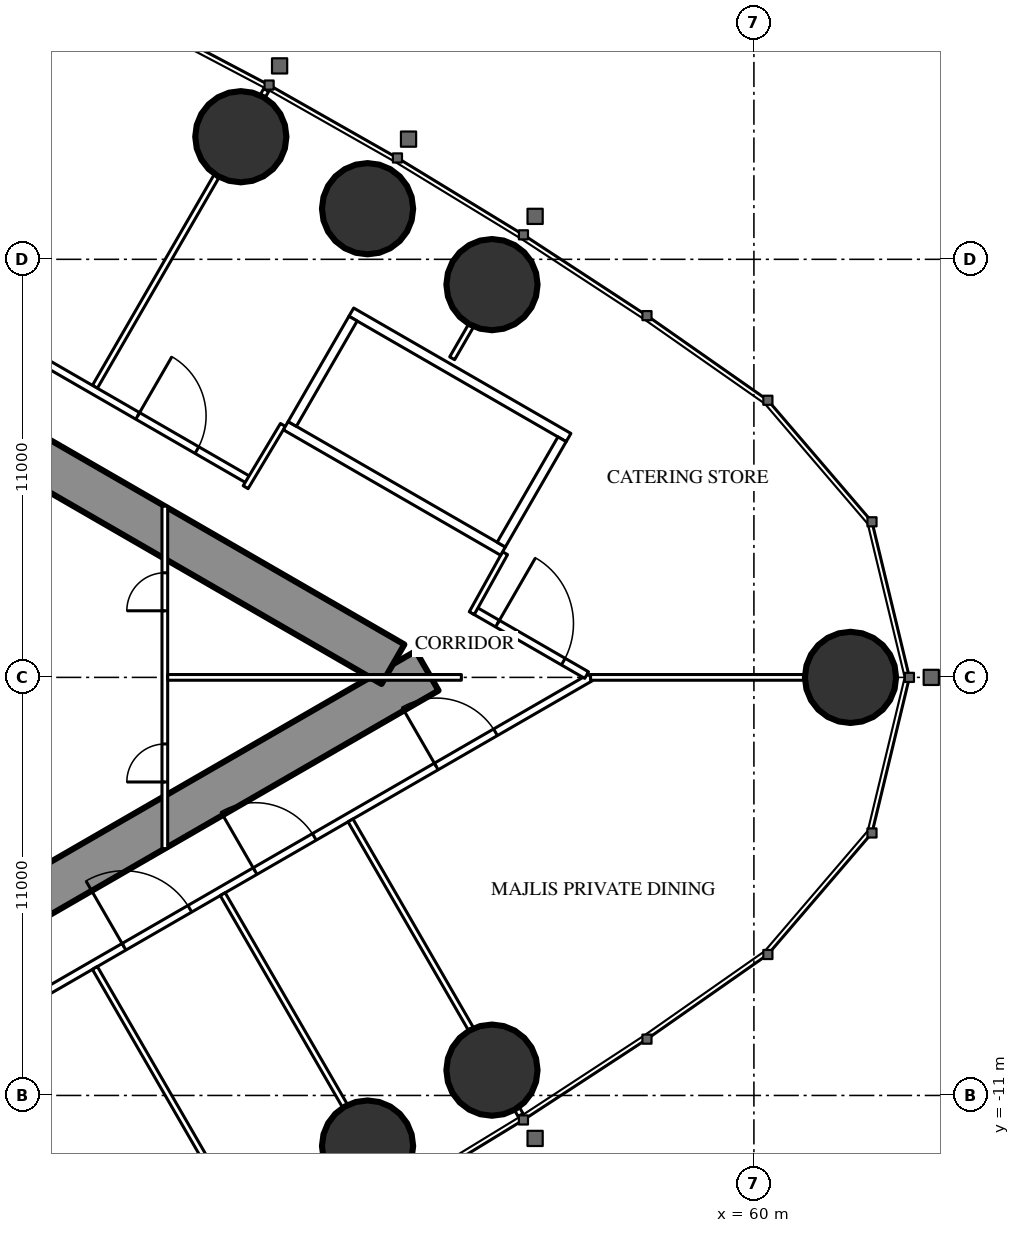
"""IFC4 building model, lengths in metres.
Left out: names, types, materials, properties, quantities, classifications, styles, units other than length and angle.
Written with IfcOpenShell. Run it as: python <this file> out.ifc"""

import sys

from ifc_helpers import new_model, si_unit, direction, frame, frame_2d, origin, origin_2d, place, context, subcontext, project, spatial, rectangle, circle, extrude, element, fill, save


model = new_model("IFC4")
c1 = context("Model", 3, precision=1e-05, world=origin(), true_north=direction((0.0, 1.0)))
c2 = subcontext(c1, "Body", "Model", "MODEL_VIEW")
j1 = project(units=[si_unit("LENGTHUNIT", "METRE"), si_unit("PLANEANGLEUNIT", "RADIAN")], contexts=[c1])
p1 = place(None, origin())
s1 = spatial("IfcSite", under=j1, at=p1, CompositionType="ELEMENT")
p2 = place(p1, origin())
s2 = spatial("IfcBuilding", under=s1, at=p2, CompositionType="ELEMENT")
p3 = place(p2, frame((0.0, 0.0, 251.9)))
s3 = spatial("IfcBuildingStorey", under=s2, at=p3, CompositionType="ELEMENT", Elevation=251.9)
for number, where, z_axis, x_axis in (
    (1, (62.542, 0.0, 0.0), (0.0, 0.0, 1.0), (1.0, 0.0, 0.0)),
    (2, (53.108, 10.334, 0.0), (0.0, 0.0, 1.0), (1.0, 0.0, 0.0)),
    (3, (49.834, 12.332, 0.0), (0.0, 0.0, 1.0), (1.0, 0.0, 0.0)),
    (4, (46.499, 14.226, 0.0), (0.0, 0.0, 1.0), (1.0, 0.0, 0.0)),
    (5, (49.834, -12.332, 0.0), (0.0, 0.0, 1.0), (1.0, 0.0, 0.0)),
    (6, (53.108, -10.334, 0.0), (0.0, 0.0, 1.0), (1.0, 0.0, 0.0)),
):
    element("IfcColumn", number, at=place(p3, frame(where, z_axis=z_axis, x_axis=x_axis)), inside=s3, PredefinedType="COLUMN", context=c2, shape_type="SweptSolid", body=[
        extrude(circle(Radius=1.2, at=origin_2d()), origin(), (0.0, 0.0, 1.0), 5.4),
    ])
p4 = place(p3, frame((27.2, -13.8, 0.0), z_axis=(0.0, 0.0, 1.0), x_axis=(0.866027159892, 0.499996958321, 0.0)))
e7 = element("IfcWall", 7, at=p4, inside=s3, PredefinedType="SHEAR", context=c2, shape_type="SweptSolid", body=[
    extrude(rectangle(XDim=27.947, YDim=1.2, at=frame_2d((13.973, 0.0))), origin(), (0.0, 0.0, 1.0), 5.4),
])
p5 = place(p4, frame((4.6, 0.0, 0.0)))
e8 = element("IfcOpeningElement", 8, at=p5, cuts=e7, PredefinedType="OPENING", context=c2, shape_type="SweptSolid", body=[
    extrude(rectangle(XDim=1.0, YDim=2.2, at=frame_2d((0.5, 1.1))), frame((0.0, 0.61, 0.0), z_axis=(0.0, -1.0, 0.0), x_axis=(1.0, 0.0, 0.0)), (0.0, 0.0, 1.0), 1.22),
])
p6 = place(p4, frame((13.395, 0.0, 0.0)))
e9 = element("IfcOpeningElement", 9, at=p6, cuts=e7, PredefinedType="OPENING", context=c2, shape_type="SweptSolid", body=[
    extrude(rectangle(XDim=1.8, YDim=2.2, at=frame_2d((0.9, 1.1))), frame((0.0, 0.61, 0.0), z_axis=(0.0, -1.0, 0.0), x_axis=(1.0, 0.0, 0.0)), (0.0, 0.0, 1.0), 1.22),
])
p7 = place(p3, frame((27.2, 13.8, 0.0), z_axis=(0.0, 0.0, 1.0), x_axis=(0.866024515034, -0.500001539357, 0.0)))
e10 = element("IfcWall", 10, at=p7, inside=s3, PredefinedType="SHEAR", context=c2, shape_type="SweptSolid", body=[
    extrude(rectangle(XDim=26.907, YDim=1.2, at=frame_2d((13.454, 0.0))), origin(), (0.0, 0.0, 1.0), 5.4),
])
p8 = place(p7, frame((4.6, 0.0, 0.0)))
e11 = element("IfcOpeningElement", 11, at=p8, cuts=e10, PredefinedType="OPENING", context=c2, shape_type="SweptSolid", body=[
    extrude(rectangle(XDim=1.0, YDim=2.2, at=frame_2d((0.5, 1.1))), frame((0.0, 0.61, 0.0), z_axis=(0.0, -1.0, 0.0), x_axis=(1.0, 0.0, 0.0)), (0.0, 0.0, 1.0), 1.22),
])
p9 = place(p7, frame((13.395, 0.0, 0.0)))
e12 = element("IfcOpeningElement", 12, at=p9, cuts=e10, PredefinedType="OPENING", context=c2, shape_type="SweptSolid", body=[
    extrude(rectangle(XDim=1.8, YDim=2.2, at=frame_2d((0.9, 1.1))), frame((0.0, 0.61, 0.0), z_axis=(0.0, -1.0, 0.0), x_axis=(1.0, 0.0, 0.0)), (0.0, 0.0, 1.0), 1.22),
])
p10 = place(p3, frame((28.907, -15.47, 0.0), z_axis=(0.0, 0.0, 1.0), x_axis=(0.866023700353, 0.500002950419, 0.0)))
e13 = element("IfcWall", 13, at=p10, inside=s3, PredefinedType="PARTITIONING", context=c2, shape_type="SweptSolid", body=[
    extrude(rectangle(XDim=30.941, YDim=0.2, at=frame_2d((15.47, 0.0))), origin(), (0.0, 0.0, 1.0), 5.15),
])
p11 = place(p10, frame((7.124, 0.0, 0.0)))
e14 = element("IfcOpeningElement", 14, at=p11, cuts=e13, PredefinedType="OPENING", context=c2, shape_type="SweptSolid", body=[
    extrude(rectangle(XDim=1.8, YDim=2.2, at=frame_2d((0.9, 1.1))), frame((0.0, 0.11, 0.0), z_axis=(0.0, -1.0, 0.0), x_axis=(1.0, 0.0, 0.0)), (0.0, 0.0, 1.0), 0.22),
])
p12 = place(p10, frame((16.765, 0.0, 0.0)))
e15 = element("IfcOpeningElement", 15, at=p12, cuts=e13, PredefinedType="OPENING", context=c2, shape_type="SweptSolid", body=[
    extrude(rectangle(XDim=2.0, YDim=2.4, at=frame_2d((1.0, 1.2))), frame((0.0, 0.11, 0.0), z_axis=(0.0, -1.0, 0.0), x_axis=(1.0, 0.0, 0.0)), (0.0, 0.0, 1.0), 0.22),
])
p13 = place(p10, frame((20.748, 0.0, 0.0)))
e16 = element("IfcOpeningElement", 16, at=p13, cuts=e13, PredefinedType="OPENING", context=c2, shape_type="SweptSolid", body=[
    extrude(rectangle(XDim=1.8, YDim=2.2, at=frame_2d((0.9, 1.1))), frame((0.0, 0.11, 0.0), z_axis=(0.0, -1.0, 0.0), x_axis=(1.0, 0.0, 0.0)), (0.0, 0.0, 1.0), 0.22),
])
p14 = place(p10, frame((26.252, 0.0, 0.0)))
e17 = element("IfcOpeningElement", 17, at=p14, cuts=e13, PredefinedType="OPENING", context=c2, shape_type="SweptSolid", body=[
    extrude(rectangle(XDim=1.8, YDim=2.2, at=frame_2d((0.9, 1.1))), frame((0.0, 0.11, 0.0), z_axis=(0.0, -1.0, 0.0), x_axis=(1.0, 0.0, 0.0)), (0.0, 0.0, 1.0), 0.22),
])
p15 = place(p3, frame((42.66, -7.646, 0.0), z_axis=(0.0, 0.0, 1.0), x_axis=(0.499996592859, -0.866027370889, 0.0)))
e18 = element("IfcWall", 18, at=p15, inside=s3, PredefinedType="PARTITIONING", context=c2, shape_type="SweptSolid", body=[
    extrude(rectangle(XDim=6.398, YDim=0.15, at=frame_2d((3.199, 0.0))), origin(), (0.0, 0.0, 1.0), 4.25),
])
p16 = place(p3, frame((46.023, -5.704, 0.0), z_axis=(0.0, 0.0, 1.0), x_axis=(0.499984478165, -0.866034365135, 0.0)))
e19 = element("IfcWall", 19, at=p16, inside=s3, PredefinedType="PARTITIONING", context=c2, shape_type="SweptSolid", body=[
    extrude(rectangle(XDim=6.426, YDim=0.15, at=frame_2d((3.213, 0.0))), origin(), (0.0, 0.0, 1.0), 4.25),
])
p17 = place(p3, frame((49.385, -3.763, 0.0), z_axis=(0.0, 0.0, 1.0), x_axis=(0.499999447814, -0.866025722589, 0.0)))
e20 = element("IfcWall", 20, at=p17, inside=s3, PredefinedType="PARTITIONING", context=c2, shape_type="SweptSolid", body=[
    extrude(rectangle(XDim=6.333, YDim=0.15, at=frame_2d((3.166, 0.0))), origin(), (0.0, 0.0, 1.0), 4.25),
])
p18 = place(p3, frame((53.771, -11.36, 0.0), z_axis=(0.0, 0.0, 1.0), x_axis=(0.499524978789, -0.866299483762, 0.0)))
e21 = element("IfcWall", 21, at=p18, inside=s3, PredefinedType="PARTITIONING", context=c2, shape_type="SweptSolid", body=[
    extrude(rectangle(XDim=0.178, YDim=0.15, at=frame_2d((0.089, 0.0))), origin(), (0.0, 0.0, 1.0), 4.25),
])
p19 = place(p3, frame((42.66, 7.646, 0.0), z_axis=(0.0, 0.0, 1.0), x_axis=(0.499996592859, 0.866027370889, 0.0)))
e22 = element("IfcWall", 22, at=p19, inside=s3, PredefinedType="PARTITIONING", context=c2, shape_type="SweptSolid", body=[
    extrude(rectangle(XDim=6.398, YDim=0.15, at=frame_2d((3.199, 0.0))), origin(), (0.0, 0.0, 1.0), 4.25),
])
p20 = place(p3, frame((47.079, 15.3, 0.0), z_axis=(0.0, 0.0, 1.0), x_axis=(0.499212083968, 0.866479829667, 0.0)))
e23 = element("IfcWall", 23, at=p20, inside=s3, PredefinedType="PARTITIONING", context=c2, shape_type="SweptSolid", body=[
    extrude(rectangle(XDim=0.179, YDim=0.15, at=frame_2d((0.09, 0.0))), origin(), (0.0, 0.0, 1.0), 4.25),
])
p21 = place(p3, frame((55.702, 0.0, 0.0), z_axis=(0.0, 0.0, 1.0), x_axis=(1.0, 0.0, 0.0)))
e24 = element("IfcWall", 24, at=p21, inside=s3, PredefinedType="PARTITIONING", context=c2, shape_type="SweptSolid", body=[
    extrude(rectangle(XDim=5.619, YDim=0.15, at=frame_2d((2.81, 0.0))), origin(), (0.0, 0.0, 1.0), 4.25),
])
p22 = place(p3, frame((52.06, 8.396, 0.0), z_axis=(0.0, 0.0, 1.0), x_axis=(0.500095379624, 0.865970329329, 0.0)))
e25 = element("IfcWall", 25, at=p22, inside=s3, PredefinedType="PARTITIONING", context=c2, shape_type="SweptSolid", body=[
    extrude(rectangle(XDim=0.982, YDim=0.15, at=frame_2d((0.491, 0.0))), origin(), (0.0, 0.0, 1.0), 5.15),
])
p23 = place(p3, frame((28.907, 15.47, 0.0), z_axis=(0.0, 0.0, 1.0), x_axis=(0.866026627509, -0.499997880441, 0.0)))
e26 = element("IfcWall", 26, at=p23, inside=s3, PredefinedType="PARTITIONING", context=c2, shape_type="SweptSolid", body=[
    extrude(rectangle(XDim=20.563, YDim=0.2, at=frame_2d((10.282, 0.0))), origin(), (0.0, 0.0, 1.0), 5.15),
])
p24 = place(p23, frame((17.181, 0.0, 0.0)))
e27 = element("IfcOpeningElement", 27, at=p24, cuts=e26, PredefinedType="OPENING", context=c2, shape_type="SweptSolid", body=[
    extrude(rectangle(XDim=1.8, YDim=2.2, at=frame_2d((0.9, 1.1))), frame((0.0, 0.11, 0.0), z_axis=(0.0, -1.0, 0.0), x_axis=(1.0, 0.0, 0.0)), (0.0, 0.0, 1.0), 0.22),
])
p25 = place(p23, frame((7.024, 0.0, 0.0)))
e28 = element("IfcOpeningElement", 28, at=p25, cuts=e26, PredefinedType="OPENING", context=c2, shape_type="SweptSolid", body=[
    extrude(rectangle(XDim=2.0, YDim=2.4, at=frame_2d((1.0, 1.2))), frame((0.0, 0.11, 0.0), z_axis=(0.0, -1.0, 0.0), x_axis=(1.0, 0.0, 0.0)), (0.0, 0.0, 1.0), 0.22),
])
p26 = place(p3, frame((52.639, 1.769, 0.0), z_axis=(0.0, 0.0, 1.0), x_axis=(0.866027340901, -0.4999966448, 0.0)))
e29 = element("IfcWall", 29, at=p26, inside=s3, PredefinedType="PARTITIONING", context=c2, shape_type="SweptSolid", body=[
    extrude(rectangle(XDim=3.417, YDim=0.2, at=frame_2d((1.708, 0.0))), origin(), (0.0, 0.0, 1.0), 5.15),
])
p27 = place(p26, frame((0.708, 0.0, 0.0)))
e30 = element("IfcOpeningElement", 30, at=p27, cuts=e29, PredefinedType="OPENING", context=c2, shape_type="SweptSolid", body=[
    extrude(rectangle(XDim=2.0, YDim=2.4, at=frame_2d((1.0, 1.2))), frame((0.0, 0.11, 0.0), z_axis=(0.0, -1.0, 0.0), x_axis=(1.0, 0.0, 0.0)), (0.0, 0.0, 1.0), 0.22),
])
p28 = place(p3, frame((47.606, 6.642, 0.0), z_axis=(0.0, 0.0, 1.0), x_axis=(-0.51353662755, -0.858067673418, 0.0)))
e31 = element("IfcWall", 31, at=p28, inside=s3, PredefinedType="PARTITIONING", context=c2, shape_type="SweptSolid", body=[
    extrude(rectangle(XDim=1.91, YDim=0.15, at=frame_2d((0.955, 0.0))), origin(), (0.0, 0.0, 1.0), 5.15),
])
p29 = place(p3, frame((52.576, 1.689, 0.0), z_axis=(0.0, 0.0, 1.0), x_axis=(0.485482130951, 0.874246590229, 0.0)))
e32 = element("IfcWall", 32, at=p29, inside=s3, PredefinedType="PARTITIONING", context=c2, shape_type="SweptSolid", body=[
    extrude(rectangle(XDim=1.805, YDim=0.15, at=frame_2d((0.902, 0.0))), origin(), (0.0, 0.0, 1.0), 5.15),
])
p30 = place(p3, frame((44.5, -4.505, 0.0), z_axis=(0.0, 0.0, 1.0), x_axis=(0.0, 1.0, 0.0)))
e33 = element("IfcWall", 33, at=p30, inside=s3, PredefinedType="PARTITIONING", context=c2, shape_type="SweptSolid", body=[
    extrude(rectangle(XDim=9.009, YDim=0.15, at=frame_2d((4.505, 0.0))), origin(), (0.0, 0.0, 1.0), 5.15),
])
p31 = place(p30, frame((1.752, 0.0, 0.0)))
e34 = element("IfcOpeningElement", 34, at=p31, cuts=e33, PredefinedType="OPENING", context=c2, shape_type="SweptSolid", body=[
    extrude(rectangle(XDim=1.0, YDim=2.2, at=frame_2d((0.5, 1.1))), frame((0.0, 0.085, 0.0), z_axis=(0.0, -1.0, 0.0), x_axis=(1.0, 0.0, 0.0)), (0.0, 0.0, 1.0), 0.17),
])
p32 = place(p30, frame((6.257, 0.0, 0.0)))
e35 = element("IfcOpeningElement", 35, at=p32, cuts=e33, PredefinedType="OPENING", context=c2, shape_type="SweptSolid", body=[
    extrude(rectangle(XDim=1.0, YDim=2.2, at=frame_2d((0.5, 1.1))), frame((0.0, 0.085, 0.0), z_axis=(0.0, -1.0, 0.0), x_axis=(1.0, 0.0, 0.0)), (0.0, 0.0, 1.0), 0.17),
])
p33 = place(p3, frame((44.575, 0.0, 0.0), z_axis=(0.0, 0.0, 1.0), x_axis=(1.0, 0.0, 0.0)))
e36 = element("IfcWall", 36, at=p33, inside=s3, PredefinedType="PARTITIONING", context=c2, shape_type="SweptSolid", body=[
    extrude(rectangle(XDim=7.727, YDim=0.15, at=frame_2d((3.864, 0.0))), origin(), (0.0, 0.0, 1.0), 4.25),
])
for number, where, z_axis, x_axis in (
    (37, (47.681, 6.622, 0.0), (0.0, 0.0, 1.0), (0.866, -0.5, 0.0)),
    (38, (49.406, 9.611, 0.0), (0.0, 0.0, 1.0), (0.866, -0.5, 0.0)),
):
    element("IfcWall", number, at=place(p3, frame(where, z_axis=z_axis, x_axis=x_axis)), inside=s3, PredefinedType="PARTITIONING", context=c2, shape_type="SweptSolid", body=[
        extrude(rectangle(XDim=6.6, YDim=0.25, at=frame_2d((3.3, 0.0))), origin(), (0.0, 0.0, 1.0), 5.15),
    ])
p34 = place(p3, frame((47.852, 6.668, 0.0), z_axis=(0.0, 0.0, 1.0), x_axis=(0.499929347863, 0.866066190972, 0.0)))
e39 = element("IfcWall", 39, at=p34, inside=s3, PredefinedType="PARTITIONING", context=c2, shape_type="SweptSolid", body=[
    extrude(rectangle(XDim=3.201, YDim=0.25, at=frame_2d((1.6, 0.0))), origin(), (0.0, 0.0, 1.0), 5.15),
])
p35 = place(p3, frame((53.352, 3.493, 0.0), z_axis=(0.0, 0.0, 1.0), x_axis=(0.499872130319, 0.866099216793, 0.0)))
e40 = element("IfcWall", 40, at=p35, inside=s3, PredefinedType="PARTITIONING", context=c2, shape_type="SweptSolid", body=[
    extrude(rectangle(XDim=3.2, YDim=0.25, at=frame_2d((1.6, 0.0))), origin(), (0.0, 0.0, 1.0), 5.15),
])
p36 = place(p12, origin())
e41 = element("IfcDoor", 41, at=p36, inside=s3, OperationType="DOUBLE_DOOR_SINGLE_SWING", PredefinedType="DOOR", context=c2, shape_type="SweptSolid", body=[
    extrude(rectangle(XDim=2.0, YDim=2.4, at=frame_2d((1.0, 1.2))), frame((0.0, 0.025, 0.0), z_axis=(0.0, -1.0, 0.0), x_axis=(1.0, 0.0, 0.0)), (0.0, 0.0, 1.0), 0.05),
])
fill(e15, e41)
p37 = place(p13, origin())
e42 = element("IfcDoor", 42, at=p37, inside=s3, OperationType="DOUBLE_DOOR_SINGLE_SWING", PredefinedType="DOOR", context=c2, shape_type="SweptSolid", body=[
    extrude(rectangle(XDim=1.8, YDim=2.2, at=frame_2d((0.9, 1.1))), frame((0.0, 0.025, 0.0), z_axis=(0.0, -1.0, 0.0), x_axis=(1.0, 0.0, 0.0)), (0.0, 0.0, 1.0), 0.05),
])
fill(e16, e42)
p38 = place(p14, origin())
e43 = element("IfcDoor", 43, at=p38, inside=s3, OperationType="DOUBLE_DOOR_SINGLE_SWING", PredefinedType="DOOR", context=c2, shape_type="SweptSolid", body=[
    extrude(rectangle(XDim=1.8, YDim=2.2, at=frame_2d((0.9, 1.1))), frame((0.0, 0.025, 0.0), z_axis=(0.0, -1.0, 0.0), x_axis=(1.0, 0.0, 0.0)), (0.0, 0.0, 1.0), 0.05),
])
fill(e17, e43)
p39 = place(p24, origin())
e44 = element("IfcDoor", 44, at=p39, inside=s3, OperationType="DOUBLE_DOOR_SINGLE_SWING", PredefinedType="DOOR", context=c2, shape_type="SweptSolid", body=[
    extrude(rectangle(XDim=1.8, YDim=2.2, at=frame_2d((0.9, 1.1))), frame((0.0, 0.025, 0.0), z_axis=(0.0, -1.0, 0.0), x_axis=(1.0, 0.0, 0.0)), (0.0, 0.0, 1.0), 0.05),
])
fill(e27, e44)
p40 = place(p27, origin())
e45 = element("IfcDoor", 45, at=p40, inside=s3, OperationType="DOUBLE_DOOR_SINGLE_SWING", PredefinedType="DOOR", context=c2, shape_type="SweptSolid", body=[
    extrude(rectangle(XDim=2.0, YDim=2.4, at=frame_2d((1.0, 1.2))), frame((0.0, 0.025, 0.0), z_axis=(0.0, -1.0, 0.0), x_axis=(1.0, 0.0, 0.0)), (0.0, 0.0, 1.0), 0.05),
])
fill(e30, e45)
p41 = place(p31, origin())
e46 = element("IfcDoor", 46, at=p41, inside=s3, OperationType="SINGLE_SWING_LEFT", PredefinedType="DOOR", context=c2, shape_type="SweptSolid", body=[
    extrude(rectangle(XDim=1.0, YDim=2.2, at=frame_2d((0.5, 1.1))), frame((0.0, 0.025, 0.0), z_axis=(0.0, -1.0, 0.0), x_axis=(1.0, 0.0, 0.0)), (0.0, 0.0, 1.0), 0.05),
])
fill(e34, e46)
p42 = place(p32, origin())
e47 = element("IfcDoor", 47, at=p42, inside=s3, OperationType="SINGLE_SWING_LEFT", PredefinedType="DOOR", context=c2, shape_type="SweptSolid", body=[
    extrude(rectangle(XDim=1.0, YDim=2.2, at=frame_2d((0.5, 1.1))), frame((0.0, 0.025, 0.0), z_axis=(0.0, -1.0, 0.0), x_axis=(1.0, 0.0, 0.0)), (0.0, 0.0, 1.0), 0.05),
])
fill(e35, e47)
save(model, sys.argv[1])
